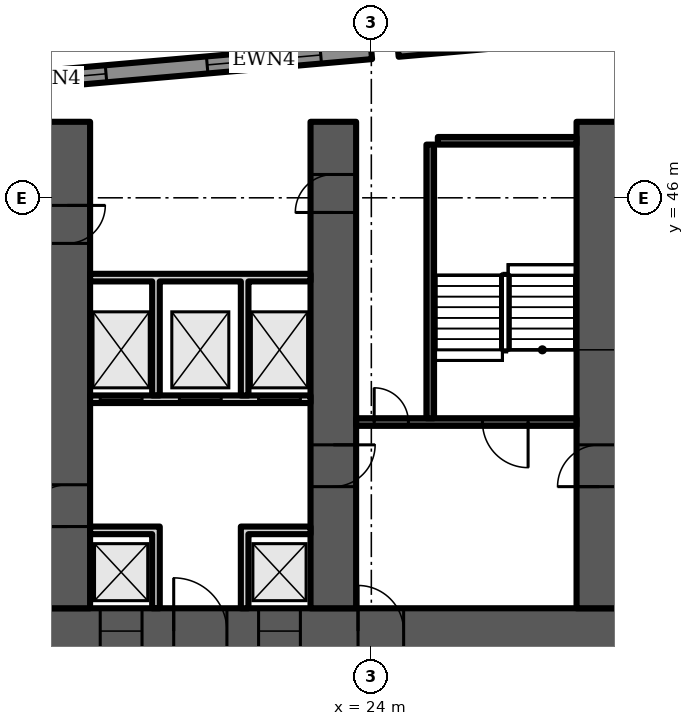
"""IFC4 building model, lengths in metres.
Left out: names, types, materials, properties, quantities, classifications, styles, units other than length and angle.
Written with IfcOpenShell. Run it as: python <this file> out.ifc"""

import sys

from ifc_helpers import new_model, si_unit, direction, frame, frame_2d, origin, place, context, subcontext, project, spatial, polyline, rectangle, outline, extrude, element, fill, save


model = new_model("IFC4")
c1 = context("Model", 3, precision=1e-05, world=origin(), true_north=direction((0.0, 1.0)))
c2 = subcontext(c1, "Body", "Model", "MODEL_VIEW")
j1 = project(units=[si_unit("LENGTHUNIT", "METRE"), si_unit("PLANEANGLEUNIT", "RADIAN")], contexts=[c1])
p1 = place(None, origin())
s1 = spatial("IfcSite", under=j1, at=p1, CompositionType="ELEMENT")
p2 = place(p1, origin())
s2 = spatial("IfcBuilding", under=s1, at=p2, CompositionType="ELEMENT")
p3 = place(p2, frame((0.0, 0.0, 27.5)))
s3 = spatial("IfcBuildingStorey", under=s2, at=p3, CompositionType="ELEMENT", Elevation=27.5)
p4 = place(p3, frame((36.0, 50.924, 0.0), z_axis=(0.0, 0.0, 1.0), x_axis=(-0.996195, -0.087145, 0.0)))
e1 = element("IfcWall", 1, at=p4, inside=s3, PredefinedType="SOLIDWALL", context=c2, shape_type="SweptSolid", body=[
    extrude(rectangle(XDim=11.344, YDim=0.45, at=frame_2d((5.672, 0.0))), origin(), (0.0, 0.0, 1.0), 5.2),
])
p5 = place(p4, frame((1.336, 0.0, 1.0)))
e2 = element("IfcOpeningElement", 2, at=p5, cuts=e1, PredefinedType="OPENING", context=c2, shape_type="SweptSolid", body=[
    extrude(rectangle(XDim=3.0, YDim=3.2, at=frame_2d((1.5, 1.6))), frame((0.0, 0.235, 0.0), z_axis=(0.0, -1.0, 0.0), x_axis=(1.0, 0.0, 0.0)), (0.0, 0.0, 1.0), 0.47),
])
p6 = place(p4, frame((7.008, 0.0, 1.0)))
e3 = element("IfcOpeningElement", 3, at=p6, cuts=e1, PredefinedType="OPENING", context=c2, shape_type="SweptSolid", body=[
    extrude(rectangle(XDim=3.0, YDim=3.2, at=frame_2d((1.5, 1.6))), frame((0.0, 0.235, 0.0), z_axis=(0.0, -1.0, 0.0), x_axis=(1.0, 0.0, 0.0)), (0.0, 0.0, 1.0), 0.47),
])
p7 = place(p3, frame((24.0, 49.874, 0.0), z_axis=(0.0, 0.0, 1.0), x_axis=(-0.996195, -0.087145, 0.0)))
e4 = element("IfcWall", 4, at=p7, inside=s3, PredefinedType="SOLIDWALL", context=c2, shape_type="SweptSolid", body=[
    extrude(rectangle(XDim=11.344, YDim=0.45, at=frame_2d((5.672, 0.0))), origin(), (0.0, 0.0, 1.0), 5.2),
])
p8 = place(p7, frame((1.336, 0.0, 1.0)))
e5 = element("IfcOpeningElement", 5, at=p8, cuts=e4, PredefinedType="OPENING", context=c2, shape_type="SweptSolid", body=[
    extrude(rectangle(XDim=3.0, YDim=3.2, at=frame_2d((1.5, 1.6))), frame((0.0, 0.235, 0.0), z_axis=(0.0, -1.0, 0.0), x_axis=(1.0, 0.0, 0.0)), (0.0, 0.0, 1.0), 0.47),
])
p9 = place(p7, frame((7.008, 0.0, 1.0)))
e6 = element("IfcOpeningElement", 6, at=p9, cuts=e4, PredefinedType="OPENING", context=c2, shape_type="SweptSolid", body=[
    extrude(rectangle(XDim=3.0, YDim=3.2, at=frame_2d((1.5, 1.6))), frame((0.0, 0.235, 0.0), z_axis=(0.0, -1.0, 0.0), x_axis=(1.0, 0.0, 0.0)), (0.0, 0.0, 1.0), 0.47),
])
p10 = place(p3, frame((9.0, 34.6, 0.0), z_axis=(0.0, 0.0, 1.0), x_axis=(1.0, 0.0, 0.0)))
e7 = element("IfcWall", 7, at=p10, inside=s3, PredefinedType="SHEAR", context=c2, shape_type="SweptSolid", body=[
    extrude(rectangle(XDim=56.0, YDim=1.2, at=frame_2d((28.0, 0.0))), origin(), (0.0, 0.0, 1.0), 5.2),
])
p11 = place(p10, frame((3.3, 0.0, 0.0)))
e8 = element("IfcOpeningElement", 8, at=p11, cuts=e7, PredefinedType="OPENING", context=c2, shape_type="SweptSolid", body=[
    extrude(rectangle(XDim=1.0, YDim=2.1, at=frame_2d((0.5, 1.05))), frame((0.0, 0.61, 0.0), z_axis=(0.0, -1.0, 0.0), x_axis=(1.0, 0.0, 0.0)), (0.0, 0.0, 1.0), 1.22),
])
p12 = place(p10, frame((7.867, 0.0, 0.0)))
e9 = element("IfcOpeningElement", 9, at=p12, cuts=e7, PredefinedType="OPENING", context=c2, shape_type="SweptSolid", body=[
    extrude(rectangle(XDim=1.1, YDim=2.1, at=frame_2d((0.55, 1.05))), frame((0.0, 0.61, 0.0), z_axis=(0.0, -1.0, 0.0), x_axis=(1.0, 0.0, 0.0)), (0.0, 0.0, 1.0), 1.22),
])
p13 = place(p10, frame((12.033, 0.0, 0.0)))
e10 = element("IfcOpeningElement", 10, at=p13, cuts=e7, PredefinedType="OPENING", context=c2, shape_type="SweptSolid", body=[
    extrude(rectangle(XDim=1.1, YDim=2.1, at=frame_2d((0.55, 1.05))), frame((0.0, 0.61, 0.0), z_axis=(0.0, -1.0, 0.0), x_axis=(1.0, 0.0, 0.0)), (0.0, 0.0, 1.0), 1.22),
])
p14 = place(p10, frame((9.8, 0.0, 0.0)))
e11 = element("IfcOpeningElement", 11, at=p14, cuts=e7, PredefinedType="OPENING", context=c2, shape_type="SweptSolid", body=[
    extrude(rectangle(XDim=1.4, YDim=2.1, at=frame_2d((0.7, 1.05))), frame((0.0, 0.61, 0.0), z_axis=(0.0, -1.0, 0.0), x_axis=(1.0, 0.0, 0.0)), (0.0, 0.0, 1.0), 1.22),
])
p15 = place(p10, frame((14.65, 0.0, 0.0)))
e12 = element("IfcOpeningElement", 12, at=p15, cuts=e7, PredefinedType="OPENING", context=c2, shape_type="SweptSolid", body=[
    extrude(rectangle(XDim=1.2, YDim=2.1, at=frame_2d((0.6, 1.05))), frame((0.0, 0.61, 0.0), z_axis=(0.0, -1.0, 0.0), x_axis=(1.0, 0.0, 0.0)), (0.0, 0.0, 1.0), 1.22),
])
p16 = place(p10, frame((21.867, 0.0, 0.0)))
e13 = element("IfcOpeningElement", 13, at=p16, cuts=e7, PredefinedType="OPENING", context=c2, shape_type="SweptSolid", body=[
    extrude(rectangle(XDim=1.1, YDim=2.1, at=frame_2d((0.55, 1.05))), frame((0.0, 0.61, 0.0), z_axis=(0.0, -1.0, 0.0), x_axis=(1.0, 0.0, 0.0)), (0.0, 0.0, 1.0), 1.22),
])
p17 = place(p10, frame((26.033, 0.0, 0.0)))
e14 = element("IfcOpeningElement", 14, at=p17, cuts=e7, PredefinedType="OPENING", context=c2, shape_type="SweptSolid", body=[
    extrude(rectangle(XDim=1.1, YDim=2.1, at=frame_2d((0.55, 1.05))), frame((0.0, 0.61, 0.0), z_axis=(0.0, -1.0, 0.0), x_axis=(1.0, 0.0, 0.0)), (0.0, 0.0, 1.0), 1.22),
])
p18 = place(p10, frame((23.8, 0.0, 0.0)))
e15 = element("IfcOpeningElement", 15, at=p18, cuts=e7, PredefinedType="OPENING", context=c2, shape_type="SweptSolid", body=[
    extrude(rectangle(XDim=1.4, YDim=2.1, at=frame_2d((0.7, 1.05))), frame((0.0, 0.61, 0.0), z_axis=(0.0, -1.0, 0.0), x_axis=(1.0, 0.0, 0.0)), (0.0, 0.0, 1.0), 1.22),
])
p19 = place(p10, frame((28.867, 0.0, 0.0)))
e16 = element("IfcOpeningElement", 16, at=p19, cuts=e7, PredefinedType="OPENING", context=c2, shape_type="SweptSolid", body=[
    extrude(rectangle(XDim=1.1, YDim=2.1, at=frame_2d((0.55, 1.05))), frame((0.0, 0.61, 0.0), z_axis=(0.0, -1.0, 0.0), x_axis=(1.0, 0.0, 0.0)), (0.0, 0.0, 1.0), 1.22),
])
p20 = place(p10, frame((33.033, 0.0, 0.0)))
e17 = element("IfcOpeningElement", 17, at=p20, cuts=e7, PredefinedType="OPENING", context=c2, shape_type="SweptSolid", body=[
    extrude(rectangle(XDim=1.1, YDim=2.1, at=frame_2d((0.55, 1.05))), frame((0.0, 0.61, 0.0), z_axis=(0.0, -1.0, 0.0), x_axis=(1.0, 0.0, 0.0)), (0.0, 0.0, 1.0), 1.22),
])
p21 = place(p10, frame((40.15, 0.0, 0.0)))
e18 = element("IfcOpeningElement", 18, at=p21, cuts=e7, PredefinedType="OPENING", context=c2, shape_type="SweptSolid", body=[
    extrude(rectangle(XDim=1.2, YDim=2.1, at=frame_2d((0.6, 1.05))), frame((0.0, 0.61, 0.0), z_axis=(0.0, -1.0, 0.0), x_axis=(1.0, 0.0, 0.0)), (0.0, 0.0, 1.0), 1.22),
])
p22 = place(p10, frame((44.8, 0.0, 0.0)))
e19 = element("IfcOpeningElement", 19, at=p22, cuts=e7, PredefinedType="OPENING", context=c2, shape_type="SweptSolid", body=[
    extrude(rectangle(XDim=1.4, YDim=2.1, at=frame_2d((0.7, 1.05))), frame((0.0, 0.61, 0.0), z_axis=(0.0, -1.0, 0.0), x_axis=(1.0, 0.0, 0.0)), (0.0, 0.0, 1.0), 1.22),
])
p23 = place(p10, frame((49.867, 0.0, 0.0)))
e20 = element("IfcOpeningElement", 20, at=p23, cuts=e7, PredefinedType="OPENING", context=c2, shape_type="SweptSolid", body=[
    extrude(rectangle(XDim=1.1, YDim=2.1, at=frame_2d((0.55, 1.05))), frame((0.0, 0.61, 0.0), z_axis=(0.0, -1.0, 0.0), x_axis=(1.0, 0.0, 0.0)), (0.0, 0.0, 1.0), 1.22),
])
p24 = place(p10, frame((53.5, 0.0, 0.0)))
e21 = element("IfcOpeningElement", 21, at=p24, cuts=e7, PredefinedType="OPENING", context=c2, shape_type="SweptSolid", body=[
    extrude(rectangle(XDim=1.1, YDim=2.1, at=frame_2d((0.55, 1.05))), frame((0.0, 0.61, 0.0), z_axis=(0.0, -1.0, 0.0), x_axis=(1.0, 0.0, 0.0)), (0.0, 0.0, 1.0), 1.22),
])
p25 = place(p10, frame((51.567, 0.0, 0.0)))
e22 = element("IfcOpeningElement", 22, at=p25, cuts=e7, PredefinedType="OPENING", context=c2, shape_type="SweptSolid", body=[
    extrude(rectangle(XDim=1.4, YDim=2.1, at=frame_2d((0.7, 1.05))), frame((0.0, 0.61, 0.0), z_axis=(0.0, -1.0, 0.0), x_axis=(1.0, 0.0, 0.0)), (0.0, 0.0, 1.0), 1.22),
])
p26 = place(p3, frame((16.0, 35.2, 0.0), z_axis=(0.0, 0.0, 1.0), x_axis=(0.0, 1.0, 0.0)))
e23 = element("IfcWall", 23, at=p26, inside=s3, PredefinedType="SHEAR", context=c2, shape_type="SweptSolid", body=[
    extrude(rectangle(XDim=12.8, YDim=1.2, at=frame_2d((6.4, 0.0))), origin(), (0.0, 0.0, 1.0), 5.2),
])
p27 = place(p26, frame((2.15, 0.0, 0.0)))
e24 = element("IfcOpeningElement", 24, at=p27, cuts=e23, PredefinedType="OPENING", context=c2, shape_type="SweptSolid", body=[
    extrude(rectangle(XDim=1.1, YDim=2.1, at=frame_2d((0.55, 1.05))), frame((0.0, 0.61, 0.0), z_axis=(0.0, -1.0, 0.0), x_axis=(1.0, 0.0, 0.0)), (0.0, 0.0, 1.0), 1.22),
])
p28 = place(p26, frame((9.6, 0.0, 0.0)))
e25 = element("IfcOpeningElement", 25, at=p28, cuts=e23, PredefinedType="OPENING", context=c2, shape_type="SweptSolid", body=[
    extrude(rectangle(XDim=1.0, YDim=2.1, at=frame_2d((0.5, 1.05))), frame((0.0, 0.61, 0.0), z_axis=(0.0, -1.0, 0.0), x_axis=(1.0, 0.0, 0.0)), (0.0, 0.0, 1.0), 1.22),
])
p29 = place(p3, frame((23.0, 35.2, 0.0), z_axis=(0.0, 0.0, 1.0), x_axis=(0.0, 1.0, 0.0)))
e26 = element("IfcWall", 26, at=p29, inside=s3, PredefinedType="SHEAR", context=c2, shape_type="SweptSolid", body=[
    extrude(rectangle(XDim=12.8, YDim=1.2, at=frame_2d((6.4, 0.0))), origin(), (0.0, 0.0, 1.0), 5.2),
])
p30 = place(p29, frame((10.414, 0.0, 0.0)))
e27 = element("IfcOpeningElement", 27, at=p30, cuts=e26, PredefinedType="OPENING", context=c2, shape_type="SweptSolid", body=[
    extrude(rectangle(XDim=1.0, YDim=2.1, at=frame_2d((0.5, 1.05))), frame((0.0, 0.61, 0.0), z_axis=(0.0, -1.0, 0.0), x_axis=(1.0, 0.0, 0.0)), (0.0, 0.0, 1.0), 1.22),
])
p31 = place(p29, frame((3.2, 0.0, 0.0)))
e28 = element("IfcOpeningElement", 28, at=p31, cuts=e26, PredefinedType="OPENING", context=c2, shape_type="SweptSolid", body=[
    extrude(rectangle(XDim=1.1, YDim=2.1, at=frame_2d((0.55, 1.05))), frame((0.0, 0.61, 0.0), z_axis=(0.0, -1.0, 0.0), x_axis=(1.0, 0.0, 0.0)), (0.0, 0.0, 1.0), 1.22),
])
p32 = place(p3, frame((30.0, 35.2, 0.0), z_axis=(0.0, 0.0, 1.0), x_axis=(0.0, 1.0, 0.0)))
e29 = element("IfcWall", 29, at=p32, inside=s3, PredefinedType="SHEAR", context=c2, shape_type="SweptSolid", body=[
    extrude(rectangle(XDim=12.8, YDim=1.2, at=frame_2d((6.4, 0.0))), origin(), (0.0, 0.0, 1.0), 5.2),
])
p33 = place(p32, frame((3.2, 0.0, 0.0)))
e30 = element("IfcOpeningElement", 30, at=p33, cuts=e29, PredefinedType="OPENING", context=c2, shape_type="SweptSolid", body=[
    extrude(rectangle(XDim=1.1, YDim=2.1, at=frame_2d((0.55, 1.05))), frame((0.0, 0.61, 0.0), z_axis=(0.0, -1.0, 0.0), x_axis=(1.0, 0.0, 0.0)), (0.0, 0.0, 1.0), 1.22),
])
p34 = place(p3, frame((16.6, 40.7, 0.0), z_axis=(0.0, 0.0, 1.0), x_axis=(1.0, 0.0, 0.0)))
e31 = element("IfcWall", 31, at=p34, inside=s3, PredefinedType="PARTITIONING", context=c2, shape_type="SweptSolid", body=[
    extrude(rectangle(XDim=5.8, YDim=0.2, at=frame_2d((2.9, 0.0))), origin(), (0.0, 0.0, 1.0), 5.2),
])
p35 = place(p34, frame((0.267, 0.0, 0.0)))
e32 = element("IfcOpeningElement", 32, at=p35, cuts=e31, PredefinedType="OPENING", context=c2, shape_type="SweptSolid", body=[
    extrude(rectangle(XDim=1.1, YDim=2.1, at=frame_2d((0.55, 1.05))), frame((0.0, 0.11, 0.0), z_axis=(0.0, -1.0, 0.0), x_axis=(1.0, 0.0, 0.0)), (0.0, 0.0, 1.0), 0.22),
])
p36 = place(p34, frame((2.35, 0.0, 0.0)))
e33 = element("IfcOpeningElement", 33, at=p36, cuts=e31, PredefinedType="OPENING", context=c2, shape_type="SweptSolid", body=[
    extrude(rectangle(XDim=1.1, YDim=2.1, at=frame_2d((0.55, 1.05))), frame((0.0, 0.11, 0.0), z_axis=(0.0, -1.0, 0.0), x_axis=(1.0, 0.0, 0.0)), (0.0, 0.0, 1.0), 0.22),
])
p37 = place(p34, frame((4.433, 0.0, 0.0)))
e34 = element("IfcOpeningElement", 34, at=p37, cuts=e31, PredefinedType="OPENING", context=c2, shape_type="SweptSolid", body=[
    extrude(rectangle(XDim=1.1, YDim=2.1, at=frame_2d((0.55, 1.05))), frame((0.0, 0.11, 0.0), z_axis=(0.0, -1.0, 0.0), x_axis=(1.0, 0.0, 0.0)), (0.0, 0.0, 1.0), 0.22),
])
p38 = place(p3, frame((0.0, 0.0, -0.0)))
e35 = element("IfcWall", 35, at=p38, inside=s3, PredefinedType="PARTITIONING", context=c2, shape_type="SweptSolid", body=[
    extrude(outline(polyline([(18.233, 37.15), (16.6, 37.15), (16.6, 37.35), (18.233, 37.35), (18.433, 37.35), (18.433, 35.2), (18.233, 35.2), (18.233, 37.15)])), origin(), (0.0, 0.0, 1.0), 5.2),
])
p39 = place(p3, frame((0.0, 0.0, -0.0)))
e36 = element("IfcWall", 36, at=p39, inside=s3, PredefinedType="PARTITIONING", context=c2, shape_type="SweptSolid", body=[
    extrude(outline(polyline([(20.567, 37.35), (20.767, 37.35), (22.4, 37.35), (22.4, 37.15), (20.767, 37.15), (20.767, 35.2), (20.567, 35.2), (20.567, 37.35)])), origin(), (0.0, 0.0, 1.0), 5.2),
])
p40 = place(p3, frame((0.0, 0.0, -0.0)))
e37 = element("IfcWall", 37, at=p40, inside=s3, PredefinedType="PARTITIONING", context=c2, shape_type="SweptSolid", body=[
    extrude(outline(polyline([(18.433, 40.8), (18.233, 40.8), (18.233, 43.8), (16.6, 43.8), (16.6, 44.0), (22.4, 44.0), (22.4, 43.8), (20.767, 43.8), (20.767, 40.8), (20.567, 40.8), (20.567, 43.8), (18.433, 43.8), (18.433, 40.8)])), origin(), (0.0, 0.0, 1.0), 5.2),
])
p41 = place(p3, frame((23.6, 40.1, 0.0), z_axis=(0.0, 0.0, 1.0), x_axis=(1.0, 0.0, 0.0)))
e38 = element("IfcWall", 38, at=p41, inside=s3, PredefinedType="SHEAR", context=c2, shape_type="SweptSolid", body=[
    extrude(rectangle(XDim=5.8, YDim=0.2, at=frame_2d((2.9, 0.0))), origin(), (0.0, 0.0, 1.0), 5.2),
])
p42 = place(p41, frame((3.325, 0.0, 0.0)))
e39 = element("IfcOpeningElement", 39, at=p42, cuts=e38, PredefinedType="OPENING", context=c2, shape_type="SweptSolid", body=[
    extrude(rectangle(XDim=1.2, YDim=2.1, at=frame_2d((0.6, 1.05))), frame((0.0, 0.11, 0.0), z_axis=(0.0, -1.0, 0.0), x_axis=(1.0, 0.0, 0.0)), (0.0, 0.0, 1.0), 0.22),
])
p43 = place(p41, frame((0.475, 0.0, 0.0)))
e40 = element("IfcOpeningElement", 40, at=p43, cuts=e38, PredefinedType="OPENING", context=c2, shape_type="SweptSolid", body=[
    extrude(rectangle(XDim=0.9, YDim=2.1, at=frame_2d((0.45, 1.05))), frame((0.0, 0.11, 0.0), z_axis=(0.0, -1.0, 0.0), x_axis=(1.0, 0.0, 0.0)), (0.0, 0.0, 1.0), 0.22),
])
p44 = place(p3, frame((25.55, 40.2, 0.0), z_axis=(0.0, 0.0, 1.0), x_axis=(0.0, 1.0, 0.0)))
e41 = element("IfcWall", 41, at=p44, inside=s3, PredefinedType="SHEAR", context=c2, shape_type="SweptSolid", body=[
    extrude(rectangle(XDim=7.2, YDim=0.2, at=frame_2d((3.6, 0.0))), origin(), (0.0, 0.0, 1.0), 5.2),
])
p45 = place(p3, frame((25.75, 47.5, 0.0), z_axis=(0.0, 0.0, 1.0), x_axis=(1.0, 0.0, 0.0)))
e42 = element("IfcWall", 42, at=p45, inside=s3, PredefinedType="SHEAR", context=c2, shape_type="SweptSolid", body=[
    extrude(rectangle(XDim=3.65, YDim=0.2, at=frame_2d((1.825, 0.0))), origin(), (0.0, 0.0, 1.0), 5.2),
])
p46 = place(p8, origin())
e43 = element("IfcWindow", 43, at=p46, inside=s3, PartitioningType="SINGLE_PANEL", PredefinedType="WINDOW", context=c2, shape_type="SweptSolid", body=[
    extrude(rectangle(XDim=3.0, YDim=3.2, at=frame_2d((1.5, 1.6))), frame((0.0, 0.105, 0.0), z_axis=(0.0, -1.0, 0.0), x_axis=(1.0, 0.0, 0.0)), (0.0, 0.0, 1.0), 0.06),
])
fill(e5, e43)
p47 = place(p9, origin())
e44 = element("IfcWindow", 44, at=p47, inside=s3, PartitioningType="SINGLE_PANEL", PredefinedType="WINDOW", context=c2, shape_type="SweptSolid", body=[
    extrude(rectangle(XDim=3.0, YDim=3.2, at=frame_2d((1.5, 1.6))), frame((0.0, 0.105, 0.0), z_axis=(0.0, -1.0, 0.0), x_axis=(1.0, 0.0, 0.0)), (0.0, 0.0, 1.0), 0.06),
])
fill(e6, e44)
p48 = place(p12, origin())
e45 = element("IfcDoor", 45, at=p48, inside=s3, OperationType="DOUBLE_DOOR_SLIDING", PredefinedType="DOOR", context=c2, shape_type="SweptSolid", body=[
    extrude(rectangle(XDim=1.1, YDim=2.1, at=frame_2d((0.55, 1.05))), frame((0.0, 0.025, 0.0), z_axis=(0.0, -1.0, 0.0), x_axis=(1.0, 0.0, 0.0)), (0.0, 0.0, 1.0), 0.05),
])
fill(e9, e45)
p49 = place(p13, origin())
e46 = element("IfcDoor", 46, at=p49, inside=s3, OperationType="DOUBLE_DOOR_SLIDING", PredefinedType="DOOR", context=c2, shape_type="SweptSolid", body=[
    extrude(rectangle(XDim=1.1, YDim=2.1, at=frame_2d((0.55, 1.05))), frame((0.0, 0.025, 0.0), z_axis=(0.0, -1.0, 0.0), x_axis=(1.0, 0.0, 0.0)), (0.0, 0.0, 1.0), 0.05),
])
fill(e10, e46)
p50 = place(p14, origin())
e47 = element("IfcDoor", 47, at=p50, inside=s3, OperationType="DOUBLE_DOOR_SINGLE_SWING", PredefinedType="DOOR", context=c2, shape_type="SweptSolid", body=[
    extrude(rectangle(XDim=1.4, YDim=2.1, at=frame_2d((0.7, 1.05))), frame((0.0, 0.025, 0.0), z_axis=(0.0, -1.0, 0.0), x_axis=(1.0, 0.0, 0.0)), (0.0, 0.0, 1.0), 0.05),
])
fill(e11, e47)
p51 = place(p35, origin())
e48 = element("IfcDoor", 48, at=p51, inside=s3, OperationType="DOUBLE_DOOR_SLIDING", PredefinedType="DOOR", context=c2, shape_type="SweptSolid", body=[
    extrude(rectangle(XDim=1.1, YDim=2.1, at=frame_2d((0.55, 1.05))), frame((0.0, 0.025, 0.0), z_axis=(0.0, -1.0, 0.0), x_axis=(1.0, 0.0, 0.0)), (0.0, 0.0, 1.0), 0.05),
])
fill(e32, e48)
p52 = place(p36, origin())
e49 = element("IfcDoor", 49, at=p52, inside=s3, OperationType="DOUBLE_DOOR_SLIDING", PredefinedType="DOOR", context=c2, shape_type="SweptSolid", body=[
    extrude(rectangle(XDim=1.1, YDim=2.1, at=frame_2d((0.55, 1.05))), frame((0.0, 0.025, 0.0), z_axis=(0.0, -1.0, 0.0), x_axis=(1.0, 0.0, 0.0)), (0.0, 0.0, 1.0), 0.05),
])
fill(e33, e49)
p53 = place(p37, origin())
e50 = element("IfcDoor", 50, at=p53, inside=s3, OperationType="DOUBLE_DOOR_SLIDING", PredefinedType="DOOR", context=c2, shape_type="SweptSolid", body=[
    extrude(rectangle(XDim=1.1, YDim=2.1, at=frame_2d((0.55, 1.05))), frame((0.0, 0.025, 0.0), z_axis=(0.0, -1.0, 0.0), x_axis=(1.0, 0.0, 0.0)), (0.0, 0.0, 1.0), 0.05),
])
fill(e34, e50)
p54 = place(p30, origin())
e51 = element("IfcDoor", 51, at=p54, inside=s3, OperationType="SINGLE_SWING_LEFT", PredefinedType="DOOR", context=c2, shape_type="SweptSolid", body=[
    extrude(rectangle(XDim=1.0, YDim=2.1, at=frame_2d((0.5, 1.05))), frame((0.0, 0.6, 0.0), z_axis=(0.0, -1.0, 0.0), x_axis=(1.0, 0.0, 0.0)), (0.0, 0.0, 1.0), 1.199),
])
fill(e27, e51)
p55 = place(p42, origin())
e52 = element("IfcDoor", 52, at=p55, inside=s3, OperationType="SINGLE_SWING_RIGHT", PredefinedType="DOOR", context=c2, shape_type="SweptSolid", body=[
    extrude(rectangle(XDim=1.2, YDim=2.1, at=frame_2d((0.6, 1.05))), frame((0.0, 0.025, 0.0), z_axis=(0.0, -1.0, 0.0), x_axis=(1.0, 0.0, 0.0)), (0.0, 0.0, 1.0), 0.05),
])
fill(e39, e52)
p56 = place(p43, origin())
e53 = element("IfcDoor", 53, at=p56, inside=s3, OperationType="SINGLE_SWING_LEFT", PredefinedType="DOOR", context=c2, shape_type="SweptSolid", body=[
    extrude(rectangle(XDim=0.9, YDim=2.1, at=frame_2d((0.45, 1.05))), frame((0.0, 0.025, 0.0), z_axis=(0.0, -1.0, 0.0), x_axis=(1.0, 0.0, 0.0)), (0.0, 0.0, 1.0), 0.05),
])
fill(e40, e53)
p57 = place(p15, origin())
e54 = element("IfcDoor", 54, at=p57, inside=s3, OperationType="SINGLE_SWING_LEFT", PredefinedType="DOOR", context=c2, shape_type="SweptSolid", body=[
    extrude(rectangle(XDim=1.2, YDim=2.1, at=frame_2d((0.6, 1.05))), frame((0.0, 0.025, 0.0), z_axis=(0.0, -1.0, 0.0), x_axis=(1.0, 0.0, 0.0)), (0.0, 0.0, 1.0), 0.05),
])
fill(e12, e54)
p58 = place(p27, origin())
e55 = element("IfcDoor", 55, at=p58, inside=s3, OperationType="SINGLE_SWING_LEFT", PredefinedType="DOOR", context=c2, shape_type="SweptSolid", body=[
    extrude(rectangle(XDim=1.1, YDim=2.1, at=frame_2d((0.55, 1.05))), frame((0.0, 0.025, 0.0), z_axis=(0.0, -1.0, 0.0), x_axis=(1.0, 0.0, 0.0)), (0.0, 0.0, 1.0), 0.05),
])
fill(e24, e55)
p59 = place(p28, origin())
e56 = element("IfcDoor", 56, at=p59, inside=s3, OperationType="SINGLE_SWING_RIGHT", PredefinedType="DOOR", context=c2, shape_type="SweptSolid", body=[
    extrude(rectangle(XDim=1.0, YDim=2.1, at=frame_2d((0.5, 1.05))), frame((0.0, 0.6, 0.0), z_axis=(0.0, -1.0, 0.0), x_axis=(1.0, 0.0, 0.0)), (0.0, 0.0, 1.0), 1.199),
])
fill(e25, e56)
p60 = place(p31, origin())
e57 = element("IfcDoor", 57, at=p60, inside=s3, OperationType="SINGLE_SWING_RIGHT", PredefinedType="DOOR", context=c2, shape_type="SweptSolid", body=[
    extrude(rectangle(XDim=1.1, YDim=2.1, at=frame_2d((0.55, 1.05))), frame((0.0, 0.025, 0.0), z_axis=(0.0, -1.0, 0.0), x_axis=(1.0, 0.0, 0.0)), (0.0, 0.0, 1.0), 0.05),
])
fill(e28, e57)
p61 = place(p33, origin())
e58 = element("IfcDoor", 58, at=p61, inside=s3, OperationType="SINGLE_SWING_LEFT", PredefinedType="DOOR", context=c2, shape_type="SweptSolid", body=[
    extrude(rectangle(XDim=1.1, YDim=2.1, at=frame_2d((0.55, 1.05))), frame((0.0, 0.025, 0.0), z_axis=(0.0, -1.0, 0.0), x_axis=(1.0, 0.0, 0.0)), (0.0, 0.0, 1.0), 0.05),
])
fill(e30, e58)
save(model, sys.argv[1])
